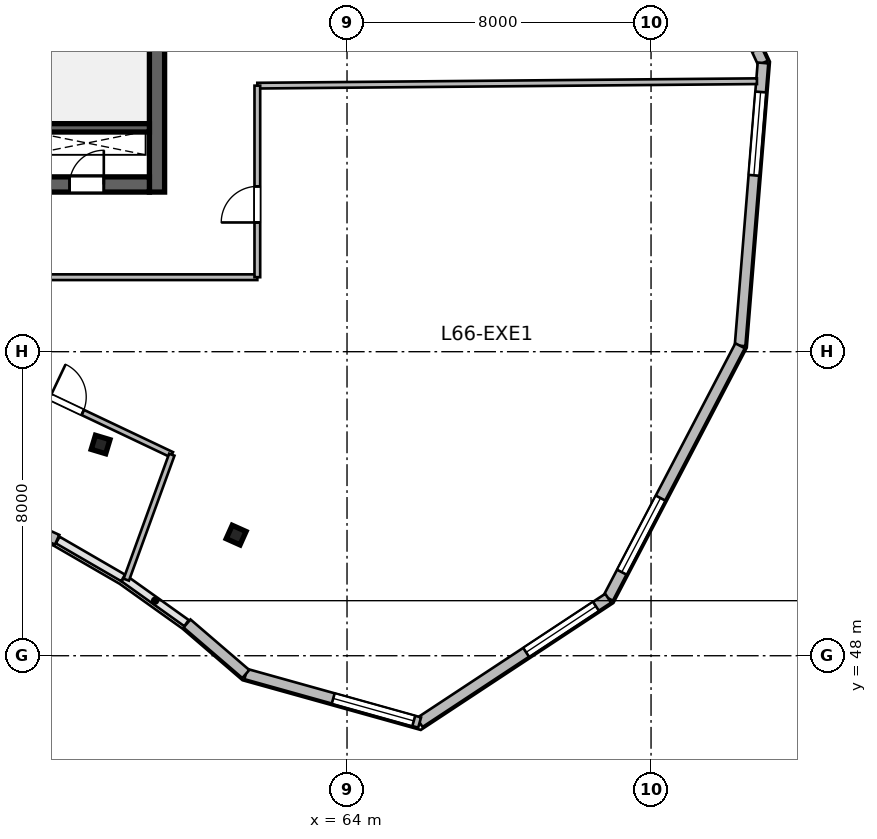
"""IFC4 building model, lengths in metres.
Left out: names, types, materials, properties, quantities, classifications, styles, units other than length and angle.
Written with IfcOpenShell. Run it as: python <this file> out.ifc"""

import sys

from ifc_helpers import new_model, si_unit, direction, frame, frame_2d, origin, origin_2d, place, context, subcontext, project, spatial, rectangle, i_section, extrude, source, transform, mapped, element, fill, save


model = new_model("IFC4")
c1 = context("Model", 3, precision=1e-05, world=origin(), true_north=direction((0.0, 1.0)))
c2 = subcontext(c1, "Body", "Model", "MODEL_VIEW")
j1 = project(units=[si_unit("LENGTHUNIT", "METRE"), si_unit("PLANEANGLEUNIT", "RADIAN")], contexts=[c1])
p1 = place(None, origin())
s1 = spatial("IfcSite", under=j1, at=p1, CompositionType="ELEMENT")
p2 = place(p1, origin())
s2 = spatial("IfcBuilding", under=s1, at=p2, CompositionType="ELEMENT")
p3 = place(p2, frame((0.0, 0.0, 271.8)))
s3 = spatial("IfcBuildingStorey", under=s2, at=p3, CompositionType="ELEMENT", Elevation=271.8)
m1 = source(origin(), c2, "Body", "SweptSolid", [
    extrude(rectangle(XDim=12.0, YDim=0.4, at=frame_2d((6.0, 0.0))), origin(), (0.0, 0.0, 1.0), 3.9),
])
p4 = place(p3, frame((59.0, 60.2, 0.0), z_axis=(0.0, 0.0, 1.0), x_axis=(0.0, 1.0, 0.0)))
e1 = element("IfcWall", 1, at=p4, inside=s3, PredefinedType="SHEAR", context=c2, shape_type="MappedRepresentation", body=[
    mapped(m1, transform((0.0, 0.0, 0.0), scale=1.0)),
])
m2 = source(origin(), c2, "Body", "SweptSolid", [
    extrude(rectangle(XDim=21.6, YDim=0.4, at=frame_2d((10.8, 0.0))), origin(), (0.0, 0.0, 1.0), 3.9),
])
p5 = place(p3, frame((37.2, 60.4, 0.0), z_axis=(0.0, 0.0, 1.0), x_axis=(1.0, 0.0, 0.0)))
e2 = element("IfcWall", 2, at=p5, inside=s3, PredefinedType="SHEAR", context=c2, shape_type="MappedRepresentation", body=[
    mapped(m2, transform((0.0, 0.0, 0.0), scale=1.0)),
])
p6 = place(p5, frame((1.1, 0.0, 0.0)))
e3 = element("IfcOpeningElement", 3, at=p6, cuts=e2, PredefinedType="OPENING", context=c2, shape_type="SweptSolid", body=[
    extrude(rectangle(XDim=1.15, YDim=2.15, at=frame_2d((0.575, 1.075))), frame((0.0, 0.21, 0.0), z_axis=(0.0, -1.0, 0.0), x_axis=(1.0, 0.0, 0.0)), (0.0, 0.0, 1.0), 0.42),
])
p7 = place(p5, frame((19.5, 0.0, 0.0)))
e4 = element("IfcOpeningElement", 4, at=p7, cuts=e2, PredefinedType="OPENING", context=c2, shape_type="SweptSolid", body=[
    extrude(rectangle(XDim=0.9, YDim=2.1, at=frame_2d((0.45, 1.05))), frame((0.0, 0.21, 0.0), z_axis=(0.0, -1.0, 0.0), x_axis=(1.0, 0.0, 0.0)), (0.0, 0.0, 1.0), 0.42),
])
p8 = place(p5, frame((12.02, 0.0, 0.0)))
e5 = element("IfcOpeningElement", 5, at=p8, cuts=e2, PredefinedType="OPENING", context=c2, shape_type="SweptSolid", body=[
    extrude(rectangle(XDim=1.6, YDim=2.15, at=frame_2d((0.8, 1.075))), frame((0.0, 0.21, 0.0), z_axis=(0.0, -1.0, 0.0), x_axis=(1.0, 0.0, 0.0)), (0.0, 0.0, 1.0), 0.42),
])
m3 = source(origin(), c2, "Body", "SweptSolid", [
    extrude(rectangle(XDim=3.27, YDim=0.22, at=frame_2d((1.635, 0.0))), origin(), (0.0, 0.0, 1.0), 3.9),
])
p9 = place(p3, frame((55.53, 61.89, 0.0), z_axis=(0.0, 0.0, 1.0), x_axis=(1.0, 0.0, 0.0)))
e6 = element("IfcWall", 6, at=p9, inside=s3, PredefinedType="SHEAR", context=c2, shape_type="MappedRepresentation", body=[
    mapped(m3, transform((0.0, 0.0, 0.0), scale=1.0)),
])
m4 = source(origin(), c2, "Body", "SweptSolid", [
    extrude(i_section(OverallWidth=0.399, OverallDepth=0.387, WebThickness=0.021, FlangeThickness=0.033, at=origin_2d()), origin(), (0.0, 0.0, 1.0), 3.9),
])
for number, where, z_axis, x_axis in (
    (7, (57.515, 53.558, 0.0), (0.0, 0.0, 1.0), (0.289, 0.957, 0.0)),
    (8, (61.082, 51.175, 0.0), (0.0, 0.0, 1.0), (0.409, 0.912, 0.0)),
):
    element("IfcColumn", number, at=place(p3, frame(where, z_axis=z_axis, x_axis=x_axis)), inside=s3, PredefinedType="COLUMN", context=c2, shape_type="MappedRepresentation", body=[
        mapped(m4, transform((0.0, 0.0, 0.0), scale=1.0)),
    ])
m5 = source(origin(), c2, "Body", "SweptSolid", [
    extrude(rectangle(XDim=5.928, YDim=0.28, at=frame_2d((2.964, 0.0))), origin(), (0.0, 0.0, 1.0), 3.64),
])
p10 = place(p3, frame((72.459, 68.979, 0.0), z_axis=(0.0, 0.0, 1.0), x_axis=(0.41942378221, -0.907790554543, 0.0)))
e9 = element("IfcWall", 9, at=p10, inside=s3, PredefinedType="SOLIDWALL", context=c2, shape_type="MappedRepresentation", body=[
    mapped(m5, transform((0.0, 0.0, 0.0), scale=1.0)),
])
p11 = place(p10, frame((3.346, 0.0, 0.95)))
e10 = element("IfcOpeningElement", 10, at=p11, cuts=e9, PredefinedType="OPENING", context=c2, shape_type="SweptSolid", body=[
    extrude(rectangle(XDim=2.2, YDim=2.1, at=frame_2d((1.1, 1.05))), frame((0.0, 0.15, 0.0), z_axis=(0.0, -1.0, 0.0), x_axis=(1.0, 0.0, 0.0)), (0.0, 0.0, 1.0), 0.3),
])
m6 = source(origin(), c2, "Body", "SweptSolid", [
    extrude(rectangle(XDim=7.466, YDim=0.28, at=frame_2d((3.733, 0.0))), origin(), (0.0, 0.0, 1.0), 3.64),
])
p12 = place(p3, frame((74.946, 63.597, 0.0), z_axis=(0.0, 0.0, 1.0), x_axis=(-0.080804454221, -0.996729973553, 0.0)))
e11 = element("IfcWall", 11, at=p12, inside=s3, PredefinedType="SOLIDWALL", context=c2, shape_type="MappedRepresentation", body=[
    mapped(m6, transform((0.0, 0.0, 0.0), scale=1.0)),
])
p13 = place(p12, frame((0.767, 0.0, 0.95)))
e12 = element("IfcOpeningElement", 12, at=p13, cuts=e11, PredefinedType="OPENING", context=c2, shape_type="SweptSolid", body=[
    extrude(rectangle(XDim=2.2, YDim=2.1, at=frame_2d((1.1, 1.05))), frame((0.0, 0.15, 0.0), z_axis=(0.0, -1.0, 0.0), x_axis=(1.0, 0.0, 0.0)), (0.0, 0.0, 1.0), 0.3),
])
m7 = source(origin(), c2, "Body", "SweptSolid", [
    extrude(rectangle(XDim=7.495, YDim=0.28, at=frame_2d((3.748, 0.0))), origin(), (0.0, 0.0, 1.0), 3.64),
])
p14 = place(p3, frame((74.343, 56.156, 0.0), z_axis=(0.0, 0.0, 1.0), x_axis=(-0.463116979657, -0.886297164135, 0.0)))
e13 = element("IfcWall", 13, at=p14, inside=s3, PredefinedType="SOLIDWALL", context=c2, shape_type="MappedRepresentation", body=[
    mapped(m7, transform((0.0, 0.0, 0.0), scale=1.0)),
])
p15 = place(p14, frame((4.521, 0.0, 0.95)))
e14 = element("IfcOpeningElement", 14, at=p15, cuts=e13, PredefinedType="OPENING", context=c2, shape_type="SweptSolid", body=[
    extrude(rectangle(XDim=2.2, YDim=2.1, at=frame_2d((1.1, 1.05))), frame((0.0, 0.15, 0.0), z_axis=(0.0, -1.0, 0.0), x_axis=(1.0, 0.0, 0.0)), (0.0, 0.0, 1.0), 0.3),
])
m8 = source(origin(), c2, "Body", "SweptSolid", [
    extrude(rectangle(XDim=5.942, YDim=0.28, at=frame_2d((2.971, 0.0))), origin(), (0.0, 0.0, 1.0), 3.64),
])
p16 = place(p3, frame((70.872, 49.513, 0.0), z_axis=(0.0, 0.0, 1.0), x_axis=(-0.834871099304, -0.550445499162, 0.0)))
e15 = element("IfcWall", 15, at=p16, inside=s3, PredefinedType="SOLIDWALL", context=c2, shape_type="MappedRepresentation", body=[
    mapped(m8, transform((0.0, 0.0, 0.0), scale=1.0)),
])
p17 = place(p16, frame((0.385, 0.0, 0.95)))
e16 = element("IfcOpeningElement", 16, at=p17, cuts=e15, PredefinedType="OPENING", context=c2, shape_type="SweptSolid", body=[
    extrude(rectangle(XDim=2.2, YDim=2.1, at=frame_2d((1.1, 1.05))), frame((0.0, 0.15, 0.0), z_axis=(0.0, -1.0, 0.0), x_axis=(1.0, 0.0, 0.0)), (0.0, 0.0, 1.0), 0.3),
])
m9 = source(origin(), c2, "Body", "SweptSolid", [
    extrude(rectangle(XDim=4.749, YDim=0.28, at=frame_2d((2.374, 0.0))), origin(), (0.0, 0.0, 1.0), 3.64),
])
p18 = place(p3, frame((65.91, 46.242, 0.0), z_axis=(0.0, 0.0, 1.0), x_axis=(-0.963210849911, 0.268746829961, 0.0)))
e17 = element("IfcWall", 17, at=p18, inside=s3, PredefinedType="SOLIDWALL", context=c2, shape_type="MappedRepresentation", body=[
    mapped(m9, transform((0.0, 0.0, 0.0), scale=1.0)),
])
p19 = place(p18, frame((0.16, 0.0, 0.95)))
e18 = element("IfcOpeningElement", 18, at=p19, cuts=e17, PredefinedType="OPENING", context=c2, shape_type="SweptSolid", body=[
    extrude(rectangle(XDim=2.2, YDim=2.1, at=frame_2d((1.1, 1.05))), frame((0.0, 0.15, 0.0), z_axis=(0.0, -1.0, 0.0), x_axis=(1.0, 0.0, 0.0)), (0.0, 0.0, 1.0), 0.3),
])
m10 = source(origin(), c2, "Body", "SweptSolid", [
    extrude(rectangle(XDim=2.04, YDim=0.28, at=frame_2d((1.02, 0.0))), origin(), (0.0, 0.0, 1.0), 3.64),
])
p20 = place(p3, frame((61.337, 47.519, 0.0), z_axis=(0.0, 0.0, 1.0), x_axis=(-0.758402847119, 0.651786101019, 0.0)))
e19 = element("IfcWall", 19, at=p20, inside=s3, PredefinedType="SOLIDWALL", context=c2, shape_type="MappedRepresentation", body=[
    mapped(m10, transform((0.0, 0.0, 0.0), scale=1.0)),
])
m11 = source(origin(), c2, "Body", "SweptSolid", [
    extrude(rectangle(XDim=1.95, YDim=0.28, at=frame_2d((0.975, 0.0))), origin(), (0.0, 0.0, 1.0), 3.64),
])
p21 = place(p3, frame((56.372, 51.052, 0.0), z_axis=(0.0, 0.0, 1.0), x_axis=(-0.910507945155, 0.413491574048, 0.0)))
e20 = element("IfcWall", 20, at=p21, inside=s3, PredefinedType="SOLIDWALL", context=c2, shape_type="MappedRepresentation", body=[
    mapped(m11, transform((0.0, 0.0, 0.0), scale=1.0)),
])
m12 = source(origin(), c2, "Body", "SweptSolid", [
    extrude(rectangle(XDim=6.137, YDim=0.15, at=frame_2d((3.069, 0.0))), origin(), (0.0, 0.0, 1.0), 3.64),
])
p22 = place(p3, frame((53.844, 55.921, 0.0), z_axis=(0.0, 0.0, 1.0), x_axis=(0.903442784804, -0.428708682657, 0.0)))
e21 = element("IfcWall", 21, at=p22, inside=s3, PredefinedType="PARTITIONING", context=c2, shape_type="MappedRepresentation", body=[
    mapped(m12, transform((0.0, 0.0, 0.0), scale=1.0)),
])
p23 = place(p22, frame((2.594, 0.0, 0.0)))
e22 = element("IfcOpeningElement", 22, at=p23, cuts=e21, PredefinedType="OPENING", context=c2, shape_type="SweptSolid", body=[
    extrude(rectangle(XDim=0.95, YDim=2.1, at=frame_2d((0.475, 1.05))), frame((0.0, 0.085, 0.0), z_axis=(0.0, -1.0, 0.0), x_axis=(1.0, 0.0, 0.0)), (0.0, 0.0, 1.0), 0.17),
])
m13 = source(origin(), c2, "Body", "SweptSolid", [
    extrude(rectangle(XDim=3.5, YDim=0.15, at=frame_2d((1.75, 0.0))), origin(), (0.0, 0.0, 1.0), 3.64),
])
p24 = place(p3, frame((58.192, 50.001, 0.0), z_axis=(0.0, 0.0, 1.0), x_axis=(0.342017493073, 0.939693585395, 0.0)))
e23 = element("IfcWall", 23, at=p24, inside=s3, PredefinedType="PARTITIONING", context=c2, shape_type="MappedRepresentation", body=[
    mapped(m13, transform((0.0, 0.0, 0.0), scale=1.0)),
])
m14 = source(origin(), c2, "Body", "SweptSolid", [
    extrude(rectangle(XDim=12.39, YDim=0.15, at=frame_2d((6.195, 0.0))), origin(), (0.0, 0.0, 1.0), 3.373),
])
p25 = place(p3, frame((49.25, 57.96, 0.0), z_axis=(0.0, 0.0, 1.0), x_axis=(1.0, 0.0, 0.0)))
e24 = element("IfcWall", 24, at=p25, inside=s3, PredefinedType="PARTITIONING", context=c2, shape_type="MappedRepresentation", body=[
    mapped(m14, transform((0.0, 0.0, 0.0), scale=1.0)),
])
m15 = source(origin(), c2, "Body", "SweptSolid", [
    extrude(rectangle(XDim=13.147, YDim=0.15, at=frame_2d((6.574, 0.0))), origin(), (0.0, 0.0, 1.0), 3.64),
])
p26 = place(p3, frame((61.64, 63.0, 0.0), z_axis=(0.0, 0.0, 1.0), x_axis=(0.999960274322, 0.008913460448, 0.0)))
e25 = element("IfcWall", 25, at=p26, inside=s3, PredefinedType="PARTITIONING", context=c2, shape_type="MappedRepresentation", body=[
    mapped(m15, transform((0.0, 0.0, 0.0), scale=1.0)),
])
m16 = source(origin(), c2, "Body", "SweptSolid", [
    extrude(rectangle(XDim=5.04, YDim=0.15, at=frame_2d((2.52, 0.0))), origin(), (0.0, 0.0, 1.0), 3.64),
])
p27 = place(p3, frame((61.64, 57.96, 0.0), z_axis=(0.0, 0.0, 1.0), x_axis=(0.0, 1.0, 0.0)))
e26 = element("IfcWall", 26, at=p27, inside=s3, PredefinedType="PARTITIONING", context=c2, shape_type="MappedRepresentation", body=[
    mapped(m16, transform((0.0, 0.0, 0.0), scale=1.0)),
])
p28 = place(p27, frame((1.44, 0.0, 0.0)))
e27 = element("IfcOpeningElement", 27, at=p28, cuts=e26, PredefinedType="OPENING", context=c2, shape_type="SweptSolid", body=[
    extrude(rectangle(XDim=0.95, YDim=2.1, at=frame_2d((0.475, 1.05))), frame((0.0, 0.085, 0.0), z_axis=(0.0, -1.0, 0.0), x_axis=(1.0, 0.0, 0.0)), (0.0, 0.0, 1.0), 0.17),
])
m17 = source(origin(), c2, "Body", "SweptSolid", [
    extrude(rectangle(XDim=2.2, YDim=2.1, at=frame_2d((1.1, 1.05))), frame((0.0, 0.03, 0.0), z_axis=(0.0, -1.0, 0.0), x_axis=(1.0, 0.0, 0.0)), (0.0, 0.0, 1.0), 0.06),
])
p29 = place(p13, origin())
e28 = element("IfcWindow", 28, at=p29, inside=s3, PartitioningType="TRIPLE_PANEL_VERTICAL", PredefinedType="WINDOW", context=c2, shape_type="MappedRepresentation", body=[
    mapped(m17, transform((0.0, 0.0, 0.0), scale=1.0)),
])
fill(e12, e28)
p30 = place(p15, origin())
e29 = element("IfcWindow", 29, at=p30, inside=s3, PartitioningType="TRIPLE_PANEL_VERTICAL", PredefinedType="WINDOW", context=c2, shape_type="MappedRepresentation", body=[
    mapped(m17, transform((0.0, 0.0, 0.0), scale=1.0)),
])
fill(e14, e29)
p31 = place(p17, origin())
e30 = element("IfcWindow", 30, at=p31, inside=s3, PartitioningType="TRIPLE_PANEL_VERTICAL", PredefinedType="WINDOW", context=c2, shape_type="MappedRepresentation", body=[
    mapped(m17, transform((0.0, 0.0, 0.0), scale=1.0)),
])
fill(e16, e30)
p32 = place(p19, origin())
e31 = element("IfcWindow", 31, at=p32, inside=s3, PartitioningType="TRIPLE_PANEL_VERTICAL", PredefinedType="WINDOW", context=c2, shape_type="MappedRepresentation", body=[
    mapped(m17, transform((0.0, 0.0, 0.0), scale=1.0)),
])
fill(e18, e31)
m18 = source(origin(), c2, "Body", "SweptSolid", [
    extrude(rectangle(XDim=0.9, YDim=2.1, at=frame_2d((0.45, 1.05))), frame((0.0, 0.025, 0.0), z_axis=(0.0, -1.0, 0.0), x_axis=(1.0, 0.0, 0.0)), (0.0, 0.0, 1.0), 0.05),
])
p33 = place(p7, origin())
e32 = element("IfcDoor", 32, at=p33, inside=s3, OperationType="SINGLE_SWING_RIGHT", PredefinedType="DOOR", context=c2, shape_type="MappedRepresentation", body=[
    mapped(m18, transform((0.0, 0.0, 0.0), scale=1.0)),
])
fill(e4, e32)
m19 = source(origin(), c2, "Body", "SweptSolid", [
    extrude(rectangle(XDim=0.95, YDim=2.1, at=frame_2d((0.475, 1.05))), frame((0.0, 0.025, 0.0), z_axis=(0.0, -1.0, 0.0), x_axis=(1.0, 0.0, 0.0)), (0.0, 0.0, 1.0), 0.05),
])
p34 = place(p23, origin())
e33 = element("IfcDoor", 33, at=p34, inside=s3, OperationType="SINGLE_SWING_LEFT", PredefinedType="DOOR", context=c2, shape_type="MappedRepresentation", body=[
    mapped(m19, transform((0.0, 0.0, 0.0), scale=1.0)),
])
fill(e22, e33)
p35 = place(p28, origin())
e34 = element("IfcDoor", 34, at=p35, inside=s3, OperationType="SINGLE_SWING_LEFT", PredefinedType="DOOR", context=c2, shape_type="MappedRepresentation", body=[
    mapped(m19, transform((0.0, 0.0, 0.0), scale=1.0)),
])
fill(e27, e34)
save(model, sys.argv[1])
